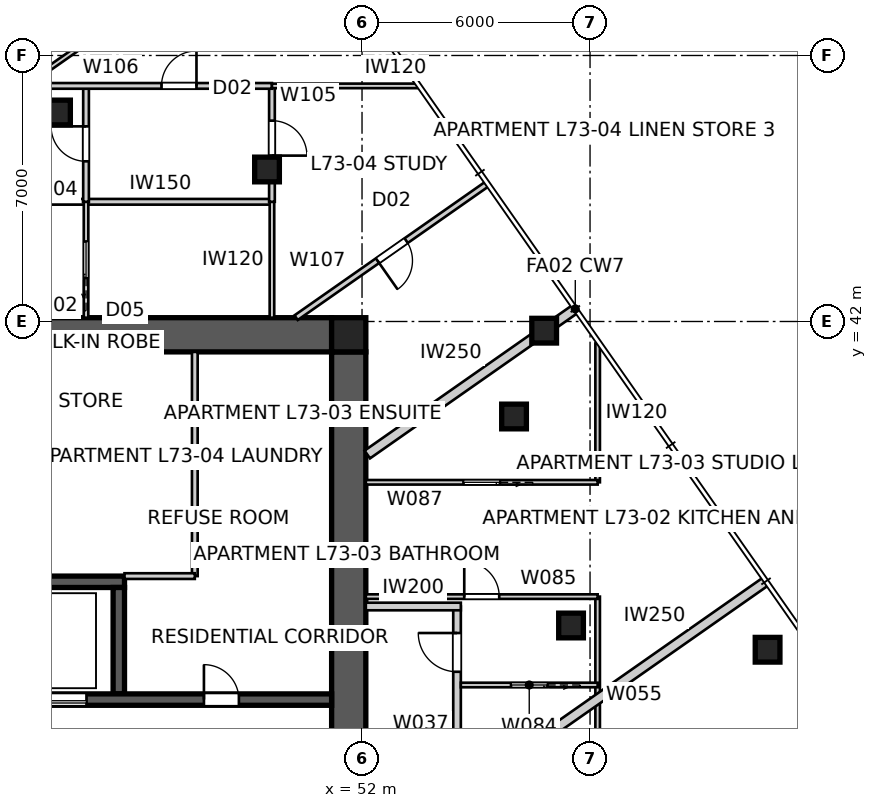
"""IFC4 building model, lengths in metres.
Left out: names, types, materials, properties, quantities, classifications, styles, units other than length and angle.
Written with IfcOpenShell. Run it as: python <this file> out.ifc"""

import sys

from ifc_helpers import new_model, si_unit, direction, frame, frame_2d, origin, origin_2d, place, context, subcontext, project, spatial, polyline, rectangle, outline, extrude, element, fill, save


model = new_model("IFC4")
c1 = context("Model", 3, precision=1e-05, world=origin(), true_north=direction((0.0, 1.0)))
c2 = subcontext(c1, "Body", "Model", "MODEL_VIEW")
j1 = project(units=[si_unit("LENGTHUNIT", "METRE"), si_unit("PLANEANGLEUNIT", "RADIAN")], contexts=[c1])
p1 = place(None, origin())
s1 = spatial("IfcSite", under=j1, at=p1, CompositionType="ELEMENT")
p2 = place(p1, origin())
s2 = spatial("IfcBuilding", under=s1, at=p2, CompositionType="ELEMENT")
p3 = place(p2, frame((0.0, 0.0, 264.2)))
s3 = spatial("IfcBuildingStorey", under=s2, at=p3, CompositionType="ELEMENT", Elevation=264.2)
p4 = place(p3, frame((28.8, 41.65, 0.0), z_axis=(0.0, 0.0, 1.0), x_axis=(1.0, 0.0, 0.0)))
e1 = element("IfcWall", 1, at=p4, inside=s3, PredefinedType="SHEAR", context=c2, shape_type="SweptSolid", body=[
    extrude(outline(polyline([(0.0, -0.45), (22.4, -0.45), (22.4, -0.025), (22.85, -0.025), (22.85, 0.025), (22.4, 0.025), (22.4, 0.45), (0.0, 0.45), (0.0, 0.025), (-0.45, 0.025), (-0.45, -0.025), (0.0, -0.025), (0.0, -0.45)])), origin(), (0.0, 0.0, 1.0), 3.4),
])
p5 = place(p3, frame((51.65, 18.8, 0.0), z_axis=(0.0, 0.0, 1.0), x_axis=(0.0, 1.0, 0.0)))
e2 = element("IfcWall", 2, at=p5, inside=s3, PredefinedType="SHEAR", context=c2, shape_type="SweptSolid", body=[
    extrude(outline(polyline([(0.0, -0.45), (22.4, -0.45), (22.4, -0.025), (22.85, -0.025), (22.85, 0.025), (22.4, 0.025), (22.4, 0.45), (0.0, 0.45), (0.0, 0.025), (-0.45, 0.025), (-0.45, -0.025), (0.0, -0.025), (0.0, -0.45)])), origin(), (0.0, 0.0, 1.0), 3.4),
])
p6 = place(p5, frame((11.14, 0.0, 0.0)))
e3 = element("IfcOpeningElement", 3, at=p6, cuts=e2, PredefinedType="OPENING", context=c2, shape_type="SweptSolid", body=[
    extrude(rectangle(XDim=1.02, YDim=2.4, at=frame_2d((0.51, 1.2))), frame((0.0, 0.46, 0.0), z_axis=(0.0, -1.0, 0.0), x_axis=(1.0, 0.0, 0.0)), (0.0, 0.0, 1.0), 0.92),
])
p7 = place(p3, frame((28.8, 32.05, 0.0), z_axis=(0.0, 0.0, 1.0), x_axis=(1.0, 0.0, 0.0)))
e4 = element("IfcWall", 4, at=p7, inside=s3, PredefinedType="SHEAR", context=c2, shape_type="SweptSolid", body=[
    extrude(rectangle(XDim=22.4, YDim=0.3, at=frame_2d((11.2, 0.0))), origin(), (0.0, 0.0, 1.0), 3.4),
])
p8 = place(p7, frame((19.04, 0.0, 0.0)))
e5 = element("IfcOpeningElement", 5, at=p8, cuts=e4, PredefinedType="OPENING", context=c2, shape_type="SweptSolid", body=[
    extrude(rectangle(XDim=0.92, YDim=2.1, at=frame_2d((0.46, 1.05))), frame((0.0, 0.16, 0.0), z_axis=(0.0, -1.0, 0.0), x_axis=(1.0, 0.0, 0.0)), (0.0, 0.0, 1.0), 0.32),
])
p9 = place(p7, frame((1.265, 0.0, 0.0)))
e6 = element("IfcOpeningElement", 6, at=p9, cuts=e4, PredefinedType="OPENING", context=c2, shape_type="SweptSolid", body=[
    extrude(rectangle(XDim=1.02, YDim=2.1, at=frame_2d((0.51, 1.05))), frame((0.0, 0.16, 0.0), z_axis=(0.0, -1.0, 0.0), x_axis=(1.0, 0.0, 0.0)), (0.0, 0.0, 1.0), 0.32),
])
p10 = place(p7, frame((4.015, 0.0, 0.0)))
e7 = element("IfcOpeningElement", 7, at=p10, cuts=e4, PredefinedType="OPENING", context=c2, shape_type="SweptSolid", body=[
    extrude(rectangle(XDim=0.92, YDim=2.1, at=frame_2d((0.46, 1.05))), frame((0.0, 0.16, 0.0), z_axis=(0.0, -1.0, 0.0), x_axis=(1.0, 0.0, 0.0)), (0.0, 0.0, 1.0), 0.32),
])
p11 = place(p7, frame((6.115, 0.0, 0.0)))
e8 = element("IfcOpeningElement", 8, at=p11, cuts=e4, PredefinedType="OPENING", context=c2, shape_type="SweptSolid", body=[
    extrude(rectangle(XDim=0.92, YDim=2.1, at=frame_2d((0.46, 1.05))), frame((0.0, 0.16, 0.0), z_axis=(0.0, -1.0, 0.0), x_axis=(1.0, 0.0, 0.0)), (0.0, 0.0, 1.0), 0.32),
])
p12 = place(p7, frame((9.79, 0.0, 0.0)))
e9 = element("IfcOpeningElement", 9, at=p12, cuts=e4, PredefinedType="OPENING", context=c2, shape_type="SweptSolid", body=[
    extrude(rectangle(XDim=0.92, YDim=2.1, at=frame_2d((0.46, 1.05))), frame((0.0, 0.16, 0.0), z_axis=(0.0, -1.0, 0.0), x_axis=(1.0, 0.0, 0.0)), (0.0, 0.0, 1.0), 0.32),
])
p13 = place(p7, frame((12.05, 0.0, 0.0)))
e10 = element("IfcOpeningElement", 10, at=p13, cuts=e4, PredefinedType="OPENING", context=c2, shape_type="SweptSolid", body=[
    extrude(rectangle(XDim=1.1, YDim=2.1, at=frame_2d((0.55, 1.05))), frame((0.0, 0.16, 0.0), z_axis=(0.0, -1.0, 0.0), x_axis=(1.0, 0.0, 0.0)), (0.0, 0.0, 1.0), 0.32),
])
p14 = place(p7, frame((14.85, 0.0, 0.0)))
e11 = element("IfcOpeningElement", 11, at=p14, cuts=e4, PredefinedType="OPENING", context=c2, shape_type="SweptSolid", body=[
    extrude(rectangle(XDim=1.1, YDim=2.1, at=frame_2d((0.55, 1.05))), frame((0.0, 0.16, 0.0), z_axis=(0.0, -1.0, 0.0), x_axis=(1.0, 0.0, 0.0)), (0.0, 0.0, 1.0), 0.32),
])
p15 = place(p3, frame((34.25, 35.15, 0.0), z_axis=(0.0, 0.0, 1.0), x_axis=(1.0, 0.0, 0.0)))
e12 = element("IfcWall", 12, at=p15, inside=s3, PredefinedType="SHEAR", context=c2, shape_type="SweptSolid", body=[
    extrude(rectangle(XDim=11.5, YDim=0.3, at=frame_2d((5.75, 0.0))), origin(), (0.0, 0.0, 1.0), 3.4),
])
p16 = place(p3, frame((45.6, 32.2, 0.0), z_axis=(0.0, 0.0, 1.0), x_axis=(0.0, 1.0, 0.0)))
e13 = element("IfcWall", 13, at=p16, inside=s3, PredefinedType="SHEAR", context=c2, shape_type="SweptSolid", body=[
    extrude(rectangle(XDim=2.8, YDim=0.3, at=frame_2d((1.4, 0.0))), origin(), (0.0, 0.0, 1.0), 3.4),
])
p17 = place(p3, frame((51.65, 41.65, 0.0), z_axis=(0.0, 0.0, 1.0), x_axis=(1.0, 0.0, 0.0)))
e14 = element("IfcColumn", 14, at=p17, inside=s3, PredefinedType="COLUMN", context=c2, shape_type="SweptSolid", body=[
    extrude(rectangle(XDim=0.9, YDim=0.9, at=origin_2d()), origin(), (0.0, 0.0, 1.0), 3.4),
])
for number, where, z_axis, x_axis in (
    (15, (62.672, 33.362, 0.0), (0.0, 0.0, 1.0), (1.0, 0.0, 0.0)),
    (16, (56.793, 41.758, 0.0), (0.0, 0.0, 1.0), (1.0, 0.0, 0.0)),
):
    element("IfcColumn", number, at=place(p3, frame(where, z_axis=z_axis, x_axis=x_axis)), inside=s3, PredefinedType="COLUMN", context=c2, shape_type="SweptSolid", body=[
        extrude(rectangle(XDim=0.65, YDim=0.65, at=origin_2d()), origin(), (0.0, 0.0, 1.0), 3.2),
    ])
for number, where, z_axis, x_axis in (
    (17, (57.5, 34.0, 0.0), (0.0, 0.0, 1.0), (1.0, 0.0, 0.0)),
    (18, (56.0, 39.5, 0.0), (0.0, 0.0, 1.0), (1.0, 0.0, 0.0)),
    (19, (49.5, 46.0, 0.0), (0.0, 0.0, 1.0), (1.0, 0.0, 0.0)),
    (20, (44.0, 47.5, 0.0), (0.0, 0.0, 1.0), (1.0, 0.0, 0.0)),
):
    element("IfcColumn", number, at=place(p3, frame(where, z_axis=z_axis, x_axis=x_axis)), inside=s3, PredefinedType="COLUMN", context=c2, shape_type="SweptSolid", body=[
        extrude(rectangle(XDim=0.65, YDim=0.65, at=origin_2d()), origin(), (0.0, 0.0, 1.0), 3.4),
    ])
p18 = place(p3, frame((54.5, 25.5, 0.0), z_axis=(0.0, 0.0, 1.0), x_axis=(0.0, 1.0, 0.0)))
e21 = element("IfcWall", 21, at=p18, inside=s3, PredefinedType="PARTITIONING", context=c2, shape_type="SweptSolid", body=[
    extrude(rectangle(XDim=9.0, YDim=0.2, at=frame_2d((4.5, 0.0))), origin(), (0.0, 0.0, 1.0), 3.2),
])
p19 = place(p18, frame((1.643, 0.0, 0.0)))
e22 = element("IfcOpeningElement", 22, at=p19, cuts=e21, PredefinedType="OPENING", context=c2, shape_type="SweptSolid", body=[
    extrude(rectangle(XDim=1.02, YDim=2.34, at=frame_2d((0.51, 1.17))), frame((0.0, 0.11, 0.0), z_axis=(0.0, -1.0, 0.0), x_axis=(1.0, 0.0, 0.0)), (0.0, 0.0, 1.0), 0.22),
])
p20 = place(p18, frame((7.282, 0.0, 0.0)))
e23 = element("IfcOpeningElement", 23, at=p20, cuts=e21, PredefinedType="OPENING", context=c2, shape_type="SweptSolid", body=[
    extrude(rectangle(XDim=1.02, YDim=2.34, at=frame_2d((0.51, 1.17))), frame((0.0, 0.11, 0.0), z_axis=(0.0, -1.0, 0.0), x_axis=(1.0, 0.0, 0.0)), (0.0, 0.0, 1.0), 0.22),
])
p21 = place(p3, frame((52.1, 34.5, 0.0), z_axis=(0.0, 0.0, 1.0), x_axis=(1.0, 0.0, 0.0)))
e24 = element("IfcWall", 24, at=p21, inside=s3, PredefinedType="PARTITIONING", context=c2, shape_type="SweptSolid", body=[
    extrude(rectangle(XDim=2.5, YDim=0.2, at=frame_2d((1.25, 0.0))), origin(), (0.0, 0.0, 1.0), 3.2),
])
p22 = place(p3, frame((57.612, 42.332, 0.0), z_axis=(0.0, 0.0, 1.0), x_axis=(-0.819161528122, -0.573562891796, 0.0)))
e25 = element("IfcWall", 25, at=p22, inside=s3, PredefinedType="PARTITIONING", context=c2, shape_type="SweptSolid", body=[
    extrude(rectangle(XDim=6.681, YDim=0.25, at=frame_2d((3.341, 0.0))), origin(), (0.0, 0.0, 1.0), 3.2),
])
p23 = place(p3, frame((62.631, 35.164, 0.0), z_axis=(0.0, 0.0, 1.0), x_axis=(-0.81915902312, -0.573566469418, 0.0)))
e26 = element("IfcWall", 26, at=p23, inside=s3, PredefinedType="PARTITIONING", context=c2, shape_type="SweptSolid", body=[
    extrude(rectangle(XDim=9.756, YDim=0.25, at=frame_2d((4.878, 0.0))), origin(), (0.0, 0.0, 1.0), 3.2),
])
p24 = place(p3, frame((47.6, 41.2, 0.0), z_axis=(0.0, 0.0, 1.0), x_axis=(0.0, -1.0, 0.0)))
e27 = element("IfcWall", 27, at=p24, inside=s3, PredefinedType="SOLIDWALL", context=c2, shape_type="SweptSolid", body=[
    extrude(rectangle(XDim=5.9, YDim=0.15, at=frame_2d((2.95, 0.0))), origin(), (0.0, 0.0, 1.0), 3.2),
])
p25 = place(p3, frame((47.6, 35.3, 0.0), z_axis=(0.0, 0.0, 1.0), x_axis=(-1.0, 0.0, 0.0)))
e28 = element("IfcWall", 28, at=p25, inside=s3, PredefinedType="SOLIDWALL", context=c2, shape_type="SweptSolid", body=[
    extrude(rectangle(XDim=1.85, YDim=0.15, at=frame_2d((0.925, 0.0))), origin(), (0.0, 0.0, 1.0), 3.2),
])
p26 = place(p3, frame((58.2, 34.76, 0.0), z_axis=(0.0, 0.0, 1.0), x_axis=(0.0, -1.0, 0.0)))
e29 = element("IfcWall", 29, at=p26, inside=s3, PredefinedType="PARTITIONING", context=c2, shape_type="SweptSolid", body=[
    extrude(rectangle(XDim=12.964, YDim=0.12, at=frame_2d((6.482, 0.0))), origin(), (0.0, 0.0, 1.0), 3.2),
])
p27 = place(p26, frame((5.162, 0.0, 0.0)))
e30 = element("IfcOpeningElement", 30, at=p27, cuts=e29, PredefinedType="OPENING", context=c2, shape_type="SweptSolid", body=[
    extrude(rectangle(XDim=0.92, YDim=2.34, at=frame_2d((0.46, 1.17))), frame((0.0, 0.07, 0.0), z_axis=(0.0, -1.0, 0.0), x_axis=(1.0, 0.0, 0.0)), (0.0, 0.0, 1.0), 0.14),
])
p28 = place(p26, frame((10.6, 0.0, 0.0)))
e31 = element("IfcOpeningElement", 31, at=p28, cuts=e29, PredefinedType="OPENING", context=c2, shape_type="SweptSolid", body=[
    extrude(rectangle(XDim=0.92, YDim=2.34, at=frame_2d((0.46, 1.17))), frame((0.0, 0.07, 0.0), z_axis=(0.0, -1.0, 0.0), x_axis=(1.0, 0.0, 0.0)), (0.0, 0.0, 1.0), 0.14),
])
p29 = place(p3, frame((58.2, 32.434, 0.0), z_axis=(0.0, 0.0, 1.0), x_axis=(-1.0, 0.0, 0.0)))
e32 = element("IfcWall", 32, at=p29, inside=s3, PredefinedType="PARTITIONING", context=c2, shape_type="SweptSolid", body=[
    extrude(rectangle(XDim=3.6, YDim=0.12, at=frame_2d((1.8, 0.0))), origin(), (0.0, 0.0, 1.0), 3.2),
])
p30 = place(p29, frame((1.32, 0.0, 0.0)))
e33 = element("IfcOpeningElement", 33, at=p30, cuts=e32, PredefinedType="OPENING", context=c2, shape_type="SweptSolid", body=[
    extrude(rectangle(XDim=0.96, YDim=2.1, at=frame_2d((0.48, 1.05))), frame((0.0, 0.07, 0.0), z_axis=(0.0, -1.0, 0.0), x_axis=(1.0, 0.0, 0.0)), (0.0, 0.0, 1.0), 0.14),
])
p31 = place(p3, frame((52.1, 34.76, 0.0), z_axis=(0.0, 0.0, 1.0), x_axis=(1.0, 0.0, 0.0)))
e34 = element("IfcWall", 34, at=p31, inside=s3, PredefinedType="PARTITIONING", context=c2, shape_type="SweptSolid", body=[
    extrude(rectangle(XDim=6.1, YDim=0.12, at=frame_2d((3.05, 0.0))), origin(), (0.0, 0.0, 1.0), 3.2),
])
p32 = place(p31, frame((2.59, 0.0, 0.0)))
e35 = element("IfcOpeningElement", 35, at=p32, cuts=e34, PredefinedType="OPENING", context=c2, shape_type="SweptSolid", body=[
    extrude(rectangle(XDim=0.92, YDim=2.34, at=frame_2d((0.46, 1.17))), frame((0.0, 0.07, 0.0), z_axis=(0.0, -1.0, 0.0), x_axis=(1.0, 0.0, 0.0)), (0.0, 0.0, 1.0), 0.14),
])
p33 = place(p3, frame((58.2, 41.422, 0.0), z_axis=(0.0, 0.0, 1.0), x_axis=(0.0, -1.0, 0.0)))
e36 = element("IfcWall", 36, at=p33, inside=s3, PredefinedType="PARTITIONING", context=c2, shape_type="SweptSolid", body=[
    extrude(rectangle(XDim=3.654, YDim=0.12, at=frame_2d((1.827, 0.0))), origin(), (0.0, 0.0, 1.0), 3.2),
])
p34 = place(p3, frame((58.2, 37.768, 0.0), z_axis=(0.0, 0.0, 1.0), x_axis=(-1.0, 0.0, 0.0)))
e37 = element("IfcWall", 37, at=p34, inside=s3, PredefinedType="PARTITIONING", context=c2, shape_type="SweptSolid", body=[
    extrude(rectangle(XDim=6.1, YDim=0.12, at=frame_2d((3.05, 0.0))), origin(), (0.0, 0.0, 1.0), 3.2),
])
p35 = place(p34, frame((2.57, 0.0, 0.0)))
e38 = element("IfcOpeningElement", 38, at=p35, cuts=e37, PredefinedType="OPENING", context=c2, shape_type="SweptSolid", body=[
    extrude(rectangle(XDim=0.96, YDim=2.1, at=frame_2d((0.48, 1.05))), frame((0.0, 0.07, 0.0), z_axis=(0.0, -1.0, 0.0), x_axis=(1.0, 0.0, 0.0)), (0.0, 0.0, 1.0), 0.14),
])
p36 = place(p3, frame((39.846, 45.15, 0.0), z_axis=(0.0, 0.0, 1.0), x_axis=(1.0, 0.0, 0.0)))
e39 = element("IfcWall", 39, at=p36, inside=s3, PredefinedType="SOLIDWALL", context=c2, shape_type="SweptSolid", body=[
    extrude(rectangle(XDim=9.784, YDim=0.15, at=frame_2d((4.892, 0.0))), origin(), (0.0, 0.0, 1.0), 3.2),
])
p37 = place(p3, frame((44.738, 42.1, 0.0), z_axis=(0.0, 0.0, 1.0), x_axis=(0.0, 1.0, 0.0)))
e40 = element("IfcWall", 40, at=p37, inside=s3, PredefinedType="PARTITIONING", context=c2, shape_type="SweptSolid", body=[
    extrude(rectangle(XDim=3.05, YDim=0.12, at=frame_2d((1.525, 0.0))), origin(), (0.0, 0.0, 1.0), 3.2),
])
p38 = place(p37, frame((1.045, 0.0, 0.0)))
e41 = element("IfcOpeningElement", 41, at=p38, cuts=e40, PredefinedType="OPENING", context=c2, shape_type="SweptSolid", body=[
    extrude(rectangle(XDim=0.96, YDim=2.1, at=frame_2d((0.48, 1.05))), frame((0.0, 0.07, 0.0), z_axis=(0.0, -1.0, 0.0), x_axis=(1.0, 0.0, 0.0)), (0.0, 0.0, 1.0), 0.14),
])
p39 = place(p3, frame((49.63, 45.15, 0.0), z_axis=(0.0, 0.0, 1.0), x_axis=(0.0, -1.0, 0.0)))
e42 = element("IfcWall", 42, at=p39, inside=s3, PredefinedType="PARTITIONING", context=c2, shape_type="SweptSolid", body=[
    extrude(rectangle(XDim=3.05, YDim=0.12, at=frame_2d((1.525, 0.0))), origin(), (0.0, 0.0, 1.0), 3.2),
])
p40 = place(p3, frame((44.738, 45.15, 0.0), z_axis=(0.0, 0.0, 1.0), x_axis=(0.0, 1.0, 0.0)))
e43 = element("IfcWall", 43, at=p40, inside=s3, PredefinedType="SOLIDWALL", context=c2, shape_type="SweptSolid", body=[
    extrude(rectangle(XDim=3.05, YDim=0.15, at=frame_2d((1.525, 0.0))), origin(), (0.0, 0.0, 1.0), 3.2),
])
p41 = place(p40, frame((1.065, 0.0, 0.0)))
e44 = element("IfcOpeningElement", 44, at=p41, cuts=e43, PredefinedType="OPENING", context=c2, shape_type="SweptSolid", body=[
    extrude(rectangle(XDim=0.92, YDim=2.1, at=frame_2d((0.46, 1.05))), frame((0.0, 0.085, 0.0), z_axis=(0.0, -1.0, 0.0), x_axis=(1.0, 0.0, 0.0)), (0.0, 0.0, 1.0), 0.17),
])
p42 = place(p3, frame((49.63, 48.2, 0.0), z_axis=(0.0, 0.0, 1.0), x_axis=(0.0, -1.0, 0.0)))
e45 = element("IfcWall", 45, at=p42, inside=s3, PredefinedType="SOLIDWALL", context=c2, shape_type="SweptSolid", body=[
    extrude(rectangle(XDim=3.05, YDim=0.15, at=frame_2d((1.525, 0.0))), origin(), (0.0, 0.0, 1.0), 3.2),
])
p43 = place(p42, frame((0.915, 0.0, 0.0)))
e46 = element("IfcOpeningElement", 46, at=p43, cuts=e45, PredefinedType="OPENING", context=c2, shape_type="SweptSolid", body=[
    extrude(rectangle(XDim=0.92, YDim=2.34, at=frame_2d((0.46, 1.17))), frame((0.0, 0.085, 0.0), z_axis=(0.0, -1.0, 0.0), x_axis=(1.0, 0.0, 0.0)), (0.0, 0.0, 1.0), 0.17),
])
p44 = place(p3, frame((39.846, 48.2, 0.0), z_axis=(0.0, 0.0, 1.0), x_axis=(1.0, 0.0, 0.0)))
e47 = element("IfcWall", 47, at=p44, inside=s3, PredefinedType="SOLIDWALL", context=c2, shape_type="SweptSolid", body=[
    extrude(rectangle(XDim=9.784, YDim=0.15, at=frame_2d((4.892, 0.0))), origin(), (0.0, 0.0, 1.0), 3.2),
])
p45 = place(p44, frame((1.51, 0.0, 0.0)))
e48 = element("IfcOpeningElement", 48, at=p45, cuts=e47, PredefinedType="OPENING", context=c2, shape_type="SweptSolid", body=[
    extrude(rectangle(XDim=0.92, YDim=2.34, at=frame_2d((0.46, 1.17))), frame((0.0, 0.085, 0.0), z_axis=(0.0, -1.0, 0.0), x_axis=(1.0, 0.0, 0.0)), (0.0, 0.0, 1.0), 0.17),
])
p46 = place(p44, frame((6.878, 0.0, 0.0)))
e49 = element("IfcOpeningElement", 49, at=p46, cuts=e47, PredefinedType="OPENING", context=c2, shape_type="SweptSolid", body=[
    extrude(rectangle(XDim=0.92, YDim=2.34, at=frame_2d((0.46, 1.17))), frame((0.0, 0.085, 0.0), z_axis=(0.0, -1.0, 0.0), x_axis=(1.0, 0.0, 0.0)), (0.0, 0.0, 1.0), 0.17),
])
p47 = place(p3, frame((55.271, 45.605, 0.0), z_axis=(0.0, 0.0, 1.0), x_axis=(-0.819158711158, -0.573566914958, 0.0)))
e50 = element("IfcWall", 50, at=p47, inside=s3, PredefinedType="SOLIDWALL", context=c2, shape_type="SweptSolid", body=[
    extrude(rectangle(XDim=6.111, YDim=0.15, at=frame_2d((3.055, 0.0))), origin(), (0.0, 0.0, 1.0), 3.2),
])
p48 = place(p47, frame((2.575, 0.0, 0.0)))
e51 = element("IfcOpeningElement", 51, at=p48, cuts=e50, PredefinedType="OPENING", context=c2, shape_type="SweptSolid", body=[
    extrude(rectangle(XDim=0.92, YDim=2.34, at=frame_2d((0.46, 1.17))), frame((0.0, 0.085, 0.0), z_axis=(0.0, -1.0, 0.0), x_axis=(1.0, 0.0, 0.0)), (0.0, 0.0, 1.0), 0.17),
])
p49 = place(p3, frame((49.63, 48.2, 0.0), z_axis=(0.0, 0.0, 1.0), x_axis=(1.0, 0.0, 0.0)))
e52 = element("IfcWall", 52, at=p49, inside=s3, PredefinedType="PARTITIONING", context=c2, shape_type="SweptSolid", body=[
    extrude(rectangle(XDim=3.824, YDim=0.12, at=frame_2d((1.912, 0.0))), origin(), (0.0, 0.0, 1.0), 3.2),
])
p50 = place(p3, frame((50.051, 53.06, 0.0), z_axis=(0.0, 0.0, 1.0), x_axis=(-0.819161994693, -0.573562225439, 0.0)))
e53 = element("IfcWall", 53, at=p50, inside=s3, PredefinedType="PARTITIONING", context=c2, shape_type="SweptSolid", body=[
    extrude(rectangle(XDim=7.71, YDim=0.12, at=frame_2d((3.855, 0.0))), origin(), (0.0, 0.0, 1.0), 3.2),
])
p51 = place(p8, origin())
e54 = element("IfcDoor", 54, at=p51, inside=s3, OperationType="SINGLE_SWING_LEFT", PredefinedType="DOOR", context=c2, shape_type="SweptSolid", body=[
    extrude(rectangle(XDim=0.92, YDim=2.1, at=frame_2d((0.46, 1.05))), frame((0.0, 0.025, 0.0), z_axis=(0.0, -1.0, 0.0), x_axis=(1.0, 0.0, 0.0)), (0.0, 0.0, 1.0), 0.05),
])
fill(e5, e54)
p52 = place(p20, origin())
e55 = element("IfcDoor", 55, at=p52, inside=s3, OperationType="SINGLE_SWING_RIGHT", PredefinedType="DOOR", context=c2, shape_type="SweptSolid", body=[
    extrude(rectangle(XDim=1.02, YDim=2.34, at=frame_2d((0.51, 1.17))), frame((0.0, 0.025, 0.0), z_axis=(0.0, -1.0, 0.0), x_axis=(1.0, 0.0, 0.0)), (0.0, 0.0, 1.0), 0.05),
])
fill(e23, e55)
p53 = place(p32, origin())
e56 = element("IfcDoor", 56, at=p53, inside=s3, OperationType="SINGLE_SWING_LEFT", PredefinedType="DOOR", context=c2, shape_type="SweptSolid", body=[
    extrude(rectangle(XDim=0.92, YDim=2.34, at=frame_2d((0.46, 1.17))), frame((0.0, 0.025, 0.0), z_axis=(0.0, -1.0, 0.0), x_axis=(1.0, 0.0, 0.0)), (0.0, 0.0, 1.0), 0.05),
])
fill(e35, e56)
p54 = place(p30, origin())
e57 = element("IfcDoor", 57, at=p54, inside=s3, OperationType="SLIDING_TO_LEFT", PredefinedType="DOOR", context=c2, shape_type="SweptSolid", body=[
    extrude(rectangle(XDim=0.96, YDim=2.1, at=frame_2d((0.48, 1.05))), frame((0.0, 0.025, 0.0), z_axis=(0.0, -1.0, 0.0), x_axis=(1.0, 0.0, 0.0)), (0.0, 0.0, 1.0), 0.05),
])
fill(e33, e57)
p55 = place(p35, origin())
e58 = element("IfcDoor", 58, at=p55, inside=s3, OperationType="SLIDING_TO_LEFT", PredefinedType="DOOR", context=c2, shape_type="SweptSolid", body=[
    extrude(rectangle(XDim=0.96, YDim=2.1, at=frame_2d((0.48, 1.05))), frame((0.0, 0.025, 0.0), z_axis=(0.0, -1.0, 0.0), x_axis=(1.0, 0.0, 0.0)), (0.0, 0.0, 1.0), 0.05),
])
fill(e38, e58)
p56 = place(p41, origin())
e59 = element("IfcDoor", 59, at=p56, inside=s3, OperationType="SINGLE_SWING_RIGHT", PredefinedType="DOOR", context=c2, shape_type="SweptSolid", body=[
    extrude(rectangle(XDim=0.92, YDim=2.1, at=frame_2d((0.46, 1.05))), frame((0.0, 0.025, 0.0), z_axis=(0.0, -1.0, 0.0), x_axis=(1.0, 0.0, 0.0)), (0.0, 0.0, 1.0), 0.05),
])
fill(e44, e59)
p57 = place(p38, origin())
e60 = element("IfcDoor", 60, at=p57, inside=s3, OperationType="SLIDING_TO_LEFT", PredefinedType="DOOR", context=c2, shape_type="SweptSolid", body=[
    extrude(rectangle(XDim=0.96, YDim=2.1, at=frame_2d((0.48, 1.05))), frame((0.0, 0.025, 0.0), z_axis=(0.0, -1.0, 0.0), x_axis=(1.0, 0.0, 0.0)), (0.0, 0.0, 1.0), 0.05),
])
fill(e41, e60)
p58 = place(p46, origin())
e61 = element("IfcDoor", 61, at=p58, inside=s3, OperationType="SINGLE_SWING_RIGHT", PredefinedType="DOOR", context=c2, shape_type="SweptSolid", body=[
    extrude(rectangle(XDim=0.92, YDim=2.34, at=frame_2d((0.46, 1.17))), frame((0.0, 0.025, 0.0), z_axis=(0.0, -1.0, 0.0), x_axis=(1.0, 0.0, 0.0)), (0.0, 0.0, 1.0), 0.05),
])
fill(e49, e61)
p59 = place(p43, origin())
e62 = element("IfcDoor", 62, at=p59, inside=s3, OperationType="SINGLE_SWING_RIGHT", PredefinedType="DOOR", context=c2, shape_type="SweptSolid", body=[
    extrude(rectangle(XDim=0.92, YDim=2.34, at=frame_2d((0.46, 1.17))), frame((0.0, 0.025, 0.0), z_axis=(0.0, -1.0, 0.0), x_axis=(1.0, 0.0, 0.0)), (0.0, 0.0, 1.0), 0.05),
])
fill(e46, e62)
p60 = place(p48, origin())
e63 = element("IfcDoor", 63, at=p60, inside=s3, OperationType="SINGLE_SWING_RIGHT", PredefinedType="DOOR", context=c2, shape_type="SweptSolid", body=[
    extrude(rectangle(XDim=0.92, YDim=2.34, at=frame_2d((0.46, 1.17))), frame((0.0, 0.025, 0.0), z_axis=(0.0, -1.0, 0.0), x_axis=(1.0, 0.0, 0.0)), (0.0, 0.0, 1.0), 0.05),
])
fill(e51, e63)
p61 = place(p14, origin())
e64 = element("IfcDoor", 64, at=p61, inside=s3, OperationType="SLIDING_TO_LEFT", PredefinedType="DOOR", context=c2, shape_type="SweptSolid", body=[
    extrude(rectangle(XDim=1.1, YDim=2.1, at=frame_2d((0.55, 1.05))), frame((0.0, 0.025, 0.0), z_axis=(0.0, -1.0, 0.0), x_axis=(1.0, 0.0, 0.0)), (0.0, 0.0, 1.0), 0.05),
])
fill(e11, e64)
save(model, sys.argv[1])
